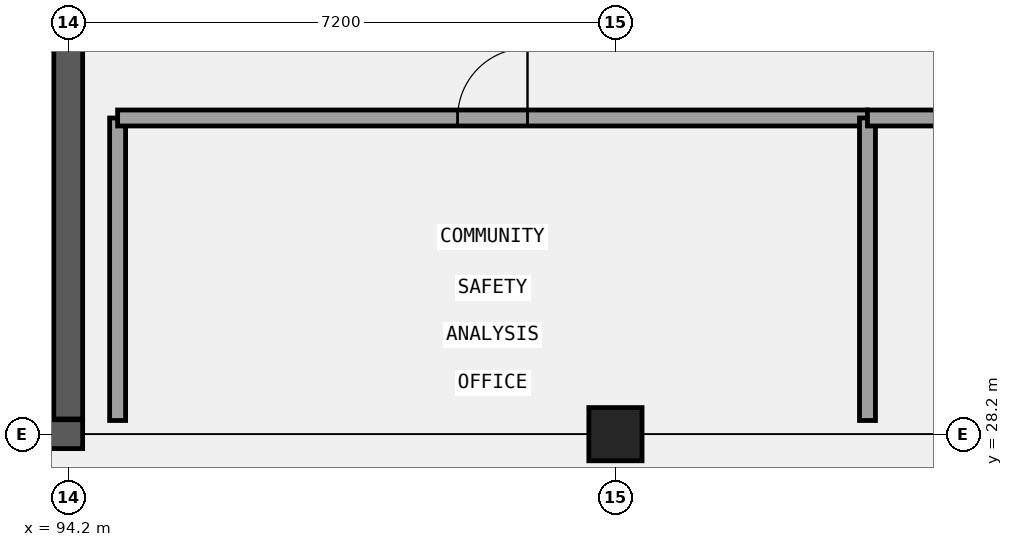
"""IFC4 building model, lengths in metres.
Left out: names, types, materials, properties, quantities, classifications, styles, units other than length and angle.
Written with IfcOpenShell. Run it as: python <this file> out.ifc"""

import sys

from ifc_helpers import new_model, si_unit, direction, frame, frame_2d, origin, origin_2d, place, context, subcontext, project, spatial, rectangle, extrude, element, fill, save


model = new_model("IFC4")
c1 = context("Model", 3, precision=1e-05, world=origin(), true_north=direction((0.0, 1.0)))
c2 = subcontext(c1, "Body", "Model", "MODEL_VIEW")
j1 = project(units=[si_unit("LENGTHUNIT", "METRE"), si_unit("PLANEANGLEUNIT", "RADIAN")], contexts=[c1])
p1 = place(None, origin())
s1 = spatial("IfcSite", under=j1, at=p1, CompositionType="ELEMENT")
p2 = place(p1, origin())
s2 = spatial("IfcBuilding", under=s1, at=p2, CompositionType="ELEMENT")
p3 = place(p2, frame((0.0, 0.0, 9.6)))
s3 = spatial("IfcBuildingStorey", under=s2, at=p3, CompositionType="ELEMENT", Elevation=9.6)
p4 = place(p3, frame((79.61, 28.2, 0.0), z_axis=(0.0, 0.0, 1.0), x_axis=(1.0, 0.0, 0.0)))
e1 = element("IfcWall", 1, at=p4, inside=s3, PredefinedType="SHEAR", context=c2, shape_type="SweptSolid", body=[
    extrude(rectangle(XDim=14.78, YDim=0.38, at=frame_2d((7.39, 0.0))), origin(), (0.0, 0.0, 1.0), 4.2),
])
p5 = place(p4, frame((3.74, 0.0, 0.0)))
e2 = element("IfcOpeningElement", 2, at=p5, cuts=e1, PredefinedType="OPENING", context=c2, shape_type="SweptSolid", body=[
    extrude(rectangle(XDim=1.3, YDim=2.2, at=frame_2d((0.65, 1.1))), frame((0.0, 0.2, 0.0), z_axis=(0.0, -1.0, 0.0), x_axis=(1.0, 0.0, 0.0)), (0.0, 0.0, 1.0), 0.4),
])
p6 = place(p3, frame((94.2, 28.4, 0.0), z_axis=(0.0, 0.0, 1.0), x_axis=(0.0, 1.0, 0.0)))
e3 = element("IfcWall", 3, at=p6, inside=s3, PredefinedType="SHEAR", context=c2, shape_type="SweptSolid", body=[
    extrude(rectangle(XDim=6.8, YDim=0.38, at=frame_2d((3.4, 0.0))), origin(), (0.0, 0.0, 1.0), 4.2),
])
p7 = place(p3, frame((80.0, 31.82, 0.0), z_axis=(0.0, 0.0, 1.0), x_axis=(1.0, 0.0, 0.0)))
e4 = element("IfcWall", 4, at=p7, inside=s3, PredefinedType="SHEAR", context=c2, shape_type="SweptSolid", body=[
    extrude(rectangle(XDim=14.0, YDim=0.38, at=frame_2d((7.0, 0.0))), origin(), (0.0, 0.0, 1.0), 4.2),
])
p8 = place(p7, frame((8.14, 0.0, 0.0)))
e5 = element("IfcOpeningElement", 5, at=p8, cuts=e4, PredefinedType="OPENING", context=c2, shape_type="SweptSolid", body=[
    extrude(rectangle(XDim=1.2, YDim=2.15, at=frame_2d((0.6, 1.075))), frame((0.0, 0.2, 0.0), z_axis=(0.0, -1.0, 0.0), x_axis=(1.0, 0.0, 0.0)), (0.0, 0.0, 1.0), 0.4),
])
p9 = place(p7, frame((0.375, 0.0, 0.0)))
e6 = element("IfcOpeningElement", 6, at=p9, cuts=e4, PredefinedType="OPENING", context=c2, shape_type="SweptSolid", body=[
    extrude(rectangle(XDim=1.15, YDim=2.15, at=frame_2d((0.575, 1.075))), frame((0.0, 0.2, 0.0), z_axis=(0.0, -1.0, 0.0), x_axis=(1.0, 0.0, 0.0)), (0.0, 0.0, 1.0), 0.4),
])
p10 = place(p3, frame((101.4, 28.2, 0.0), z_axis=(0.0, 0.0, 1.0), x_axis=(1.0, 0.0, 0.0)))
e7 = element("IfcColumn", 7, at=p10, inside=s3, PredefinedType="COLUMN", context=c2, shape_type="SweptSolid", body=[
    extrude(rectangle(XDim=0.7, YDim=0.7, at=origin_2d()), origin(), (0.0, 0.0, 1.0), 4.2),
])
p11 = place(p3, frame((94.85, 28.38, 0.0), z_axis=(0.0, 0.0, 1.0), x_axis=(0.0, 1.0, 0.0)))
e8 = element("IfcWall", 8, at=p11, inside=s3, PredefinedType="PARTITIONING", context=c2, shape_type="SweptSolid", body=[
    extrude(rectangle(XDim=3.98, YDim=0.21, at=frame_2d((1.99, 0.0))), origin(), (0.0, 0.0, 1.0), 3.94),
])
p12 = place(p3, frame((94.85, 32.36, 0.0), z_axis=(0.0, 0.0, 1.0), x_axis=(1.0, 0.0, 0.0)))
e9 = element("IfcWall", 9, at=p12, inside=s3, PredefinedType="PARTITIONING", context=c2, shape_type="SweptSolid", body=[
    extrude(rectangle(XDim=9.866, YDim=0.21, at=frame_2d((4.933, 0.0))), origin(), (0.0, 0.0, 1.0), 3.94),
])
p13 = place(p12, frame((4.473, 0.0, 0.0)))
e10 = element("IfcOpeningElement", 10, at=p13, cuts=e9, PredefinedType="OPENING", context=c2, shape_type="SweptSolid", body=[
    extrude(rectangle(XDim=0.92, YDim=2.35, at=frame_2d((0.46, 1.175))), frame((0.0, 0.115, 0.0), z_axis=(0.0, -1.0, 0.0), x_axis=(1.0, 0.0, 0.0)), (0.0, 0.0, 1.0), 0.23),
])
p14 = place(p3, frame((104.716, 28.38, 0.0), z_axis=(0.0, 0.0, 1.0), x_axis=(0.0, 1.0, 0.0)))
e11 = element("IfcWall", 11, at=p14, inside=s3, PredefinedType="PARTITIONING", context=c2, shape_type="SweptSolid", body=[
    extrude(rectangle(XDim=3.98, YDim=0.21, at=frame_2d((1.99, 0.0))), origin(), (0.0, 0.0, 1.0), 3.94),
])
p15 = place(p3, frame((104.716, 32.36, 0.0), z_axis=(0.0, 0.0, 1.0), x_axis=(1.0, 0.0, 0.0)))
e12 = element("IfcWall", 12, at=p15, inside=s3, PredefinedType="PARTITIONING", context=c2, shape_type="SweptSolid", body=[
    extrude(rectangle(XDim=9.866, YDim=0.21, at=frame_2d((4.933, 0.0))), origin(), (0.0, 0.0, 1.0), 3.94),
])
p16 = place(p15, frame((4.443, 0.0, 0.0)))
e13 = element("IfcOpeningElement", 13, at=p16, cuts=e12, PredefinedType="OPENING", context=c2, shape_type="SweptSolid", body=[
    extrude(rectangle(XDim=0.98, YDim=2.1, at=frame_2d((0.49, 1.05))), frame((0.0, 0.115, 0.0), z_axis=(0.0, -1.0, 0.0), x_axis=(1.0, 0.0, 0.0)), (0.0, 0.0, 1.0), 0.23),
])
p17 = place(p13, frame((0.92, 0.0, 0.0), z_axis=(0.0, 0.0, 1.0), x_axis=(-1.0, 0.0, 0.0)))
e14 = element("IfcDoor", 14, at=p17, inside=s3, OperationType="SINGLE_SWING_RIGHT", PredefinedType="DOOR", context=c2, shape_type="SweptSolid", body=[
    extrude(rectangle(XDim=0.92, YDim=2.35, at=frame_2d((0.46, 1.175))), frame((0.0, 0.025, 0.0), z_axis=(0.0, -1.0, 0.0), x_axis=(1.0, 0.0, 0.0)), (0.0, 0.0, 1.0), 0.05),
])
fill(e10, e14)
save(model, sys.argv[1])
